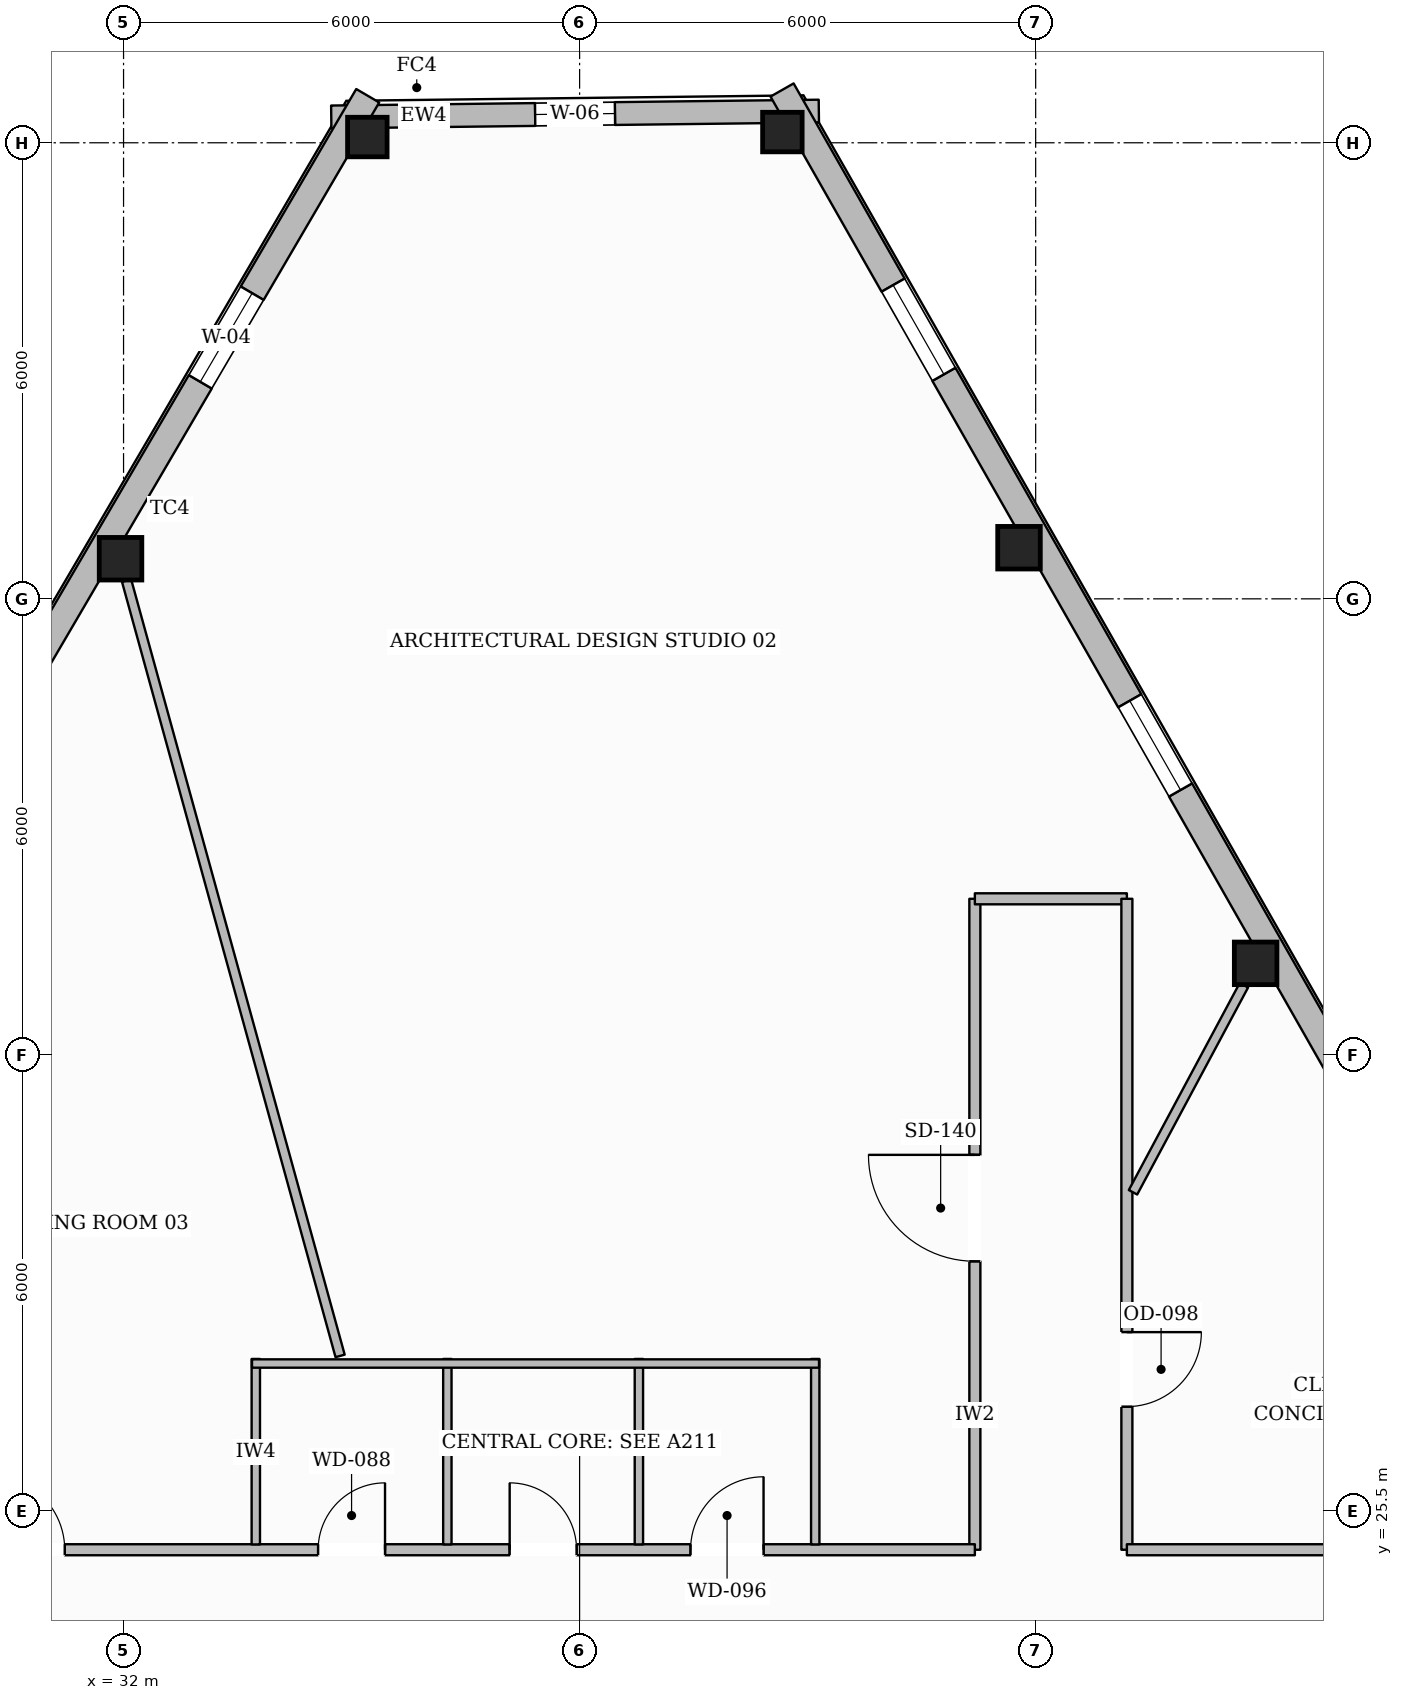
"""IFC4 building model, lengths in metres.
Left out: names, types, materials, properties, quantities, classifications, styles, units other than length and angle.
Written with IfcOpenShell. Run it as: python <this file> out.ifc"""

import sys

from ifc_helpers import new_model, si_unit, direction, frame, frame_2d, origin, origin_2d, place, context, subcontext, project, spatial, rectangle, hollow_rectangle, extrude, element, fill, save


model = new_model("IFC4")
c1 = context("Model", 3, precision=1e-05, world=origin(), true_north=direction((0.0, 1.0)))
c2 = subcontext(c1, "Body", "Model", "MODEL_VIEW")
j1 = project(units=[si_unit("LENGTHUNIT", "METRE"), si_unit("PLANEANGLEUNIT", "RADIAN")], contexts=[c1])
p1 = place(None, origin())
s1 = spatial("IfcSite", under=j1, at=p1, CompositionType="ELEMENT")
p2 = place(p1, origin())
s2 = spatial("IfcBuilding", under=s1, at=p2, CompositionType="ELEMENT")
p3 = place(p2, frame((0.0, 0.0, 289.55)))
s3 = spatial("IfcBuildingStorey", under=s2, at=p3, CompositionType="ELEMENT", Elevation=289.55)
p4 = place(p3, frame((35.208, 43.575, 0.0), z_axis=(0.0, 0.0, 1.0), x_axis=(1.0, 0.0, 0.0)))
e1 = element("IfcColumn", 1, at=p4, inside=s3, PredefinedType="COLUMN", context=c2, shape_type="SweptSolid", body=[
    extrude(hollow_rectangle(XDim=0.52, YDim=0.52, WallThickness=0.024, at=origin_2d()), origin(), (0.0, 0.0, 1.0), 3.61),
])
for number, where, z_axis, x_axis in (
    (2, (31.96, 38.028, 0.0), (0.0, 0.0, 1.0), (1.0, 0.0, 0.0)),
    (3, (46.894, 32.705, 0.0), (0.0, 0.0, 1.0), (1.0, 0.0, 0.0)),
    (4, (43.781, 38.173, 0.0), (0.0, 0.0, 1.0), (1.0, 0.0, 0.0)),
):
    element("IfcColumn", number, at=place(p3, frame(where, z_axis=z_axis, x_axis=x_axis)), inside=s3, PredefinedType="COLUMN", context=c2, shape_type="SweptSolid", body=[
        extrude(hollow_rectangle(XDim=0.56, YDim=0.56, WallThickness=0.025, at=origin_2d()), origin(), (0.0, 0.0, 1.0), 3.61),
    ])
p5 = place(p3, frame((40.668, 43.641, 0.0), z_axis=(0.0, 0.0, 1.0), x_axis=(1.0, 0.0, 0.0)))
e5 = element("IfcColumn", 5, at=p5, inside=s3, PredefinedType="COLUMN", context=c2, shape_type="SweptSolid", body=[
    extrude(hollow_rectangle(XDim=0.52, YDim=0.52, WallThickness=0.024, at=origin_2d()), origin(), (0.0, 0.0, 1.0), 3.61),
])
p6 = place(p3, frame((34.733, 43.84, 0.0), z_axis=(0.0, 0.0, 1.0), x_axis=(0.999928144693, 0.011987720859, 0.0)))
e6 = element("IfcWall", 6, at=p6, inside=s3, PredefinedType="STANDARD", context=c2, shape_type="SweptSolid", body=[
    extrude(rectangle(XDim=6.415, YDim=0.3, at=frame_2d((3.208, 0.0))), origin(), (0.0, 0.0, 1.0), 3.196),
])
p7 = place(p6, frame((2.683, 0.0, 0.65)))
e7 = element("IfcOpeningElement", 7, at=p7, cuts=e6, PredefinedType="OPENING", context=c2, shape_type="SweptSolid", body=[
    extrude(rectangle(XDim=1.05, YDim=1.7, at=frame_2d((0.525, 0.85))), frame((0.0, 0.16, 0.0), z_axis=(0.0, -1.0, 0.0), x_axis=(1.0, 0.0, 0.0)), (0.0, 0.0, 1.0), 0.32),
])
p8 = place(p3, frame((15.251, 10.013, 0.0), z_axis=(0.0, 0.0, 1.0), x_axis=(0.505125442866, 0.863045935608, 0.0)))
e8 = element("IfcWall", 8, at=p8, inside=s3, PredefinedType="STANDARD", context=c2, shape_type="SweptSolid", body=[
    extrude(rectangle(XDim=39.517, YDim=0.35, at=frame_2d((19.759, 0.0))), origin(), (0.0, 0.0, 1.0), 3.196),
])
p9 = place(p8, frame((35.157, 0.0, 0.65)))
e9 = element("IfcOpeningElement", 9, at=p9, cuts=e8, PredefinedType="OPENING", context=c2, shape_type="SweptSolid", body=[
    extrude(rectangle(XDim=1.35, YDim=1.75, at=frame_2d((0.675, 0.875))), frame((0.0, 0.185, 0.0), z_axis=(0.0, -1.0, 0.0), x_axis=(1.0, 0.0, 0.0)), (0.0, 0.0, 1.0), 0.37),
])
p10 = place(p8, frame((28.729, 0.0, 0.65)))
e10 = element("IfcOpeningElement", 10, at=p10, cuts=e8, PredefinedType="OPENING", context=c2, shape_type="SweptSolid", body=[
    extrude(rectangle(XDim=1.35, YDim=1.75, at=frame_2d((0.675, 0.875))), frame((0.0, 0.185, 0.0), z_axis=(0.0, -1.0, 0.0), x_axis=(1.0, 0.0, 0.0)), (0.0, 0.0, 1.0), 0.37),
])
p11 = place(p8, frame((15.872, 0.0, 0.65)))
e11 = element("IfcOpeningElement", 11, at=p11, cuts=e8, PredefinedType="OPENING", context=c2, shape_type="SweptSolid", body=[
    extrude(rectangle(XDim=1.35, YDim=1.75, at=frame_2d((0.675, 0.875))), frame((0.0, 0.185, 0.0), z_axis=(0.0, -1.0, 0.0), x_axis=(1.0, 0.0, 0.0)), (0.0, 0.0, 1.0), 0.37),
])
p12 = place(p8, frame((9.444, 0.0, 0.65)))
e12 = element("IfcOpeningElement", 12, at=p12, cuts=e8, PredefinedType="OPENING", context=c2, shape_type="SweptSolid", body=[
    extrude(rectangle(XDim=1.35, YDim=1.75, at=frame_2d((0.675, 0.875))), frame((0.0, 0.185, 0.0), z_axis=(0.0, -1.0, 0.0), x_axis=(1.0, 0.0, 0.0)), (0.0, 0.0, 1.0), 0.37),
])
p13 = place(p8, frame((3.016, 0.0, 0.65)))
e13 = element("IfcOpeningElement", 13, at=p13, cuts=e8, PredefinedType="OPENING", context=c2, shape_type="SweptSolid", body=[
    extrude(rectangle(XDim=1.35, YDim=1.75, at=frame_2d((0.675, 0.875))), frame((0.0, 0.185, 0.0), z_axis=(0.0, -1.0, 0.0), x_axis=(1.0, 0.0, 0.0)), (0.0, 0.0, 1.0), 0.37),
])
p14 = place(p3, frame((40.664, 44.194, 0.0), z_axis=(0.0, 0.0, 1.0), x_axis=(0.494747407388, -0.869036824814, 0.0)))
e14 = element("IfcWall", 14, at=p14, inside=s3, PredefinedType="STANDARD", context=c2, shape_type="SweptSolid", body=[
    extrude(rectangle(XDim=38.713, YDim=0.35, at=frame_2d((19.357, 0.0))), origin(), (0.0, 0.0, 1.0), 3.196),
])
p15 = place(p14, frame((34.415, 0.0, 0.65)))
e15 = element("IfcOpeningElement", 15, at=p15, cuts=e14, PredefinedType="OPENING", context=c2, shape_type="SweptSolid", body=[
    extrude(rectangle(XDim=1.35, YDim=1.75, at=frame_2d((0.675, 0.875))), frame((0.0, 0.185, 0.0), z_axis=(0.0, -1.0, 0.0), x_axis=(1.0, 0.0, 0.0)), (0.0, 0.0, 1.0), 0.37),
])
p16 = place(p14, frame((28.123, 0.0, 0.65)))
e16 = element("IfcOpeningElement", 16, at=p16, cuts=e14, PredefinedType="OPENING", context=c2, shape_type="SweptSolid", body=[
    extrude(rectangle(XDim=1.35, YDim=1.75, at=frame_2d((0.675, 0.875))), frame((0.0, 0.185, 0.0), z_axis=(0.0, -1.0, 0.0), x_axis=(1.0, 0.0, 0.0)), (0.0, 0.0, 1.0), 0.37),
])
p17 = place(p14, frame((15.539, 0.0, 0.65)))
e17 = element("IfcOpeningElement", 17, at=p17, cuts=e14, PredefinedType="OPENING", context=c2, shape_type="SweptSolid", body=[
    extrude(rectangle(XDim=1.35, YDim=1.75, at=frame_2d((0.675, 0.875))), frame((0.0, 0.185, 0.0), z_axis=(0.0, -1.0, 0.0), x_axis=(1.0, 0.0, 0.0)), (0.0, 0.0, 1.0), 0.37),
])
p18 = place(p14, frame((9.246, 0.0, 0.65)))
e18 = element("IfcOpeningElement", 18, at=p18, cuts=e14, PredefinedType="OPENING", context=c2, shape_type="SweptSolid", body=[
    extrude(rectangle(XDim=1.35, YDim=1.75, at=frame_2d((0.675, 0.875))), frame((0.0, 0.185, 0.0), z_axis=(0.0, -1.0, 0.0), x_axis=(1.0, 0.0, 0.0)), (0.0, 0.0, 1.0), 0.37),
])
p19 = place(p14, frame((2.954, 0.0, 0.65)))
e19 = element("IfcOpeningElement", 19, at=p19, cuts=e14, PredefinedType="OPENING", context=c2, shape_type="SweptSolid", body=[
    extrude(rectangle(XDim=1.35, YDim=1.75, at=frame_2d((0.675, 0.875))), frame((0.0, 0.185, 0.0), z_axis=(0.0, -1.0, 0.0), x_axis=(1.0, 0.0, 0.0)), (0.0, 0.0, 1.0), 0.37),
])
p20 = place(p3, frame((43.2, 24.99, 0.0), z_axis=(0.0, 0.0, 1.0), x_axis=(0.0, 1.0, 0.0)))
e20 = element("IfcWall", 20, at=p20, inside=s3, PredefinedType="PARTITIONING", context=c2, shape_type="SweptSolid", body=[
    extrude(rectangle(XDim=8.564, YDim=0.145, at=frame_2d((4.282, 0.0))), origin(), (0.0, 0.0, 1.0), 3.61),
])
p21 = place(p20, frame((3.795, 0.0, 0.0)))
e21 = element("IfcOpeningElement", 21, at=p21, cuts=e20, PredefinedType="OPENING", context=c2, shape_type="SweptSolid", body=[
    extrude(rectangle(XDim=1.4, YDim=2.2, at=frame_2d((0.7, 1.1))), frame((0.0, 0.083, 0.0), z_axis=(0.0, -1.0, 0.0), x_axis=(1.0, 0.0, 0.0)), (0.0, 0.0, 1.0), 0.165),
])
p22 = place(p3, frame((43.2, 33.554, 0.0), z_axis=(0.0, 0.0, 1.0), x_axis=(1.0, 0.0, 0.0)))
e22 = element("IfcWall", 22, at=p22, inside=s3, PredefinedType="PARTITIONING", context=c2, shape_type="SweptSolid", body=[
    extrude(rectangle(XDim=2.0, YDim=0.145, at=frame_2d((1.0, 0.0))), origin(), (0.0, 0.0, 1.0), 3.61),
])
p23 = place(p3, frame((45.2, 33.554, 0.0), z_axis=(0.0, 0.0, 1.0), x_axis=(0.0, -1.0, 0.0)))
e23 = element("IfcWall", 23, at=p23, inside=s3, PredefinedType="PARTITIONING", context=c2, shape_type="SweptSolid", body=[
    extrude(rectangle(XDim=8.564, YDim=0.145, at=frame_2d((4.282, 0.0))), origin(), (0.0, 0.0, 1.0), 3.61),
])
p24 = place(p23, frame((5.701, 0.0, 0.0)))
e24 = element("IfcOpeningElement", 24, at=p24, cuts=e23, PredefinedType="OPENING", context=c2, shape_type="SweptSolid", body=[
    extrude(rectangle(XDim=0.98, YDim=2.15, at=frame_2d((0.49, 1.075))), frame((0.0, 0.083, 0.0), z_axis=(0.0, -1.0, 0.0), x_axis=(1.0, 0.0, 0.0)), (0.0, 0.0, 1.0), 0.165),
])
p25 = place(p3, frame((45.2, 24.99, 0.0), z_axis=(0.0, 0.0, 1.0), x_axis=(1.0, 0.0, 0.0)))
e25 = element("IfcWall", 25, at=p25, inside=s3, PredefinedType="PARTITIONING", context=c2, shape_type="SweptSolid", body=[
    extrude(rectangle(XDim=4.71, YDim=0.145, at=frame_2d((2.355, 0.0))), origin(), (0.0, 0.0, 1.0), 3.61),
])
p26 = place(p3, frame((26.09, 24.99, 0.0), z_axis=(0.0, 0.0, 1.0), x_axis=(1.0, 0.0, 0.0)))
e26 = element("IfcWall", 26, at=p26, inside=s3, PredefinedType="PARTITIONING", context=c2, shape_type="SweptSolid", body=[
    extrude(rectangle(XDim=17.11, YDim=0.145, at=frame_2d((8.555, 0.0))), origin(), (0.0, 0.0, 1.0), 3.61),
])
p27 = place(p26, frame((8.47, 0.0, 0.0)))
e27 = element("IfcOpeningElement", 27, at=p27, cuts=e26, PredefinedType="OPENING", context=c2, shape_type="SweptSolid", body=[
    extrude(rectangle(XDim=0.88, YDim=2.1, at=frame_2d((0.44, 1.05))), frame((0.0, 0.083, 0.0), z_axis=(0.0, -1.0, 0.0), x_axis=(1.0, 0.0, 0.0)), (0.0, 0.0, 1.0), 0.165),
])
p28 = place(p26, frame((10.99, 0.0, 0.0)))
e28 = element("IfcOpeningElement", 28, at=p28, cuts=e26, PredefinedType="OPENING", context=c2, shape_type="SweptSolid", body=[
    extrude(rectangle(XDim=0.88, YDim=2.1, at=frame_2d((0.44, 1.05))), frame((0.0, 0.083, 0.0), z_axis=(0.0, -1.0, 0.0), x_axis=(1.0, 0.0, 0.0)), (0.0, 0.0, 1.0), 0.165),
])
p29 = place(p26, frame((13.37, 0.0, 0.0)))
e29 = element("IfcOpeningElement", 29, at=p29, cuts=e26, PredefinedType="OPENING", context=c2, shape_type="SweptSolid", body=[
    extrude(rectangle(XDim=0.96, YDim=2.1, at=frame_2d((0.48, 1.05))), frame((0.0, 0.083, 0.0), z_axis=(0.0, -1.0, 0.0), x_axis=(1.0, 0.0, 0.0)), (0.0, 0.0, 1.0), 0.165),
])
p30 = place(p26, frame((4.156, 0.0, 0.0)))
e30 = element("IfcOpeningElement", 30, at=p30, cuts=e26, PredefinedType="OPENING", context=c2, shape_type="SweptSolid", body=[
    extrude(rectangle(XDim=0.98, YDim=2.15, at=frame_2d((0.49, 1.075))), frame((0.0, 0.083, 0.0), z_axis=(0.0, -1.0, 0.0), x_axis=(1.0, 0.0, 0.0)), (0.0, 0.0, 1.0), 0.165),
])
for number, where, z_axis, x_axis in (
    (31, (33.74, 25.06, 0.0), (0.0, 0.0, 1.0), (0.0, 1.0, 0.0)),
    (32, (36.26, 25.06, 0.0), (0.0, 0.0, 1.0), (0.0, 1.0, 0.0)),
    (33, (38.78, 25.06, 0.0), (0.0, 0.0, 1.0), (0.0, 1.0, 0.0)),
    (34, (41.1, 25.06, 0.0), (0.0, 0.0, 1.0), (0.0, 1.0, 0.0)),
):
    element("IfcWall", number, at=place(p3, frame(where, z_axis=z_axis, x_axis=x_axis)), inside=s3, PredefinedType="PLUMBINGWALL", context=c2, shape_type="SweptSolid", body=[
        extrude(rectangle(XDim=2.44, YDim=0.11, at=frame_2d((1.22, 0.0))), origin(), (0.0, 0.0, 1.0), 3.61),
    ])
p31 = place(p3, frame((33.69, 27.44, 0.0), z_axis=(0.0, 0.0, 1.0), x_axis=(1.0, 0.0, 0.0)))
e35 = element("IfcWall", 35, at=p31, inside=s3, PredefinedType="PLUMBINGWALL", context=c2, shape_type="SweptSolid", body=[
    extrude(rectangle(XDim=7.46, YDim=0.11, at=frame_2d((3.73, 0.0))), origin(), (0.0, 0.0, 1.0), 3.61),
])
p32 = place(p3, frame((45.281, 29.693, 0.0), z_axis=(0.0, 0.0, 1.0), x_axis=(0.472162212873, 0.881511681564, 0.0)))
e36 = element("IfcWall", 36, at=p32, inside=s3, PredefinedType="PARTITIONING", context=c2, shape_type="SweptSolid", body=[
    extrude(rectangle(XDim=3.09, YDim=0.125, at=frame_2d((1.545, 0.0))), origin(), (0.0, 0.0, 1.0), 3.61),
])
p33 = place(p3, frame((34.849, 27.54, 0.0), z_axis=(0.0, 0.0, 1.0), x_axis=(-0.265543710565, 0.964098821584, 0.0)))
e37 = element("IfcWall", 37, at=p33, inside=s3, PredefinedType="PARTITIONING", context=c2, shape_type="SweptSolid", body=[
    extrude(rectangle(XDim=10.58, YDim=0.125, at=frame_2d((5.29, 0.0))), origin(), (0.0, 0.0, 1.0), 3.61),
])
p34 = place(p9, origin())
e38 = element("IfcWindow", 38, at=p34, inside=s3, PartitioningType="SINGLE_PANEL", PredefinedType="WINDOW", context=c2, shape_type="SweptSolid", body=[
    extrude(rectangle(XDim=1.35, YDim=1.75, at=frame_2d((0.675, 0.875))), frame((0.0, 0.03, 0.0), z_axis=(0.0, -1.0, 0.0), x_axis=(1.0, 0.0, 0.0)), (0.0, 0.0, 1.0), 0.06),
])
fill(e9, e38)
p35 = place(p18, origin())
e39 = element("IfcWindow", 39, at=p35, inside=s3, PartitioningType="SINGLE_PANEL", PredefinedType="WINDOW", context=c2, shape_type="SweptSolid", body=[
    extrude(rectangle(XDim=1.35, YDim=1.75, at=frame_2d((0.675, 0.875))), frame((0.0, 0.03, 0.0), z_axis=(0.0, -1.0, 0.0), x_axis=(1.0, 0.0, 0.0)), (0.0, 0.0, 1.0), 0.06),
])
fill(e18, e39)
p36 = place(p19, origin())
e40 = element("IfcWindow", 40, at=p36, inside=s3, PartitioningType="SINGLE_PANEL", PredefinedType="WINDOW", context=c2, shape_type="SweptSolid", body=[
    extrude(rectangle(XDim=1.35, YDim=1.75, at=frame_2d((0.675, 0.875))), frame((0.0, 0.03, 0.0), z_axis=(0.0, -1.0, 0.0), x_axis=(1.0, 0.0, 0.0)), (0.0, 0.0, 1.0), 0.06),
])
fill(e19, e40)
p37 = place(p7, origin())
e41 = element("IfcWindow", 41, at=p37, inside=s3, PartitioningType="SINGLE_PANEL", PredefinedType="WINDOW", context=c2, shape_type="SweptSolid", body=[
    extrude(rectangle(XDim=1.05, YDim=1.7, at=frame_2d((0.525, 0.85))), frame((0.0, 0.03, 0.0), z_axis=(0.0, -1.0, 0.0), x_axis=(1.0, 0.0, 0.0)), (0.0, 0.0, 1.0), 0.06),
])
fill(e7, e41)
p38 = place(p27, origin())
e42 = element("IfcDoor", 42, at=p38, inside=s3, OperationType="SINGLE_SWING_RIGHT", PredefinedType="DOOR", context=c2, shape_type="SweptSolid", body=[
    extrude(rectangle(XDim=0.88, YDim=2.1, at=frame_2d((0.44, 1.05))), frame((0.0, 0.025, 0.0), z_axis=(0.0, -1.0, 0.0), x_axis=(1.0, 0.0, 0.0)), (0.0, 0.0, 1.0), 0.05),
])
fill(e27, e42)
p39 = place(p28, origin())
e43 = element("IfcDoor", 43, at=p39, inside=s3, OperationType="SINGLE_SWING_LEFT", PredefinedType="DOOR", context=c2, shape_type="SweptSolid", body=[
    extrude(rectangle(XDim=0.88, YDim=2.1, at=frame_2d((0.44, 1.05))), frame((0.0, 0.025, 0.0), z_axis=(0.0, -1.0, 0.0), x_axis=(1.0, 0.0, 0.0)), (0.0, 0.0, 1.0), 0.05),
])
fill(e28, e43)
p40 = place(p29, origin())
e44 = element("IfcDoor", 44, at=p40, inside=s3, OperationType="SINGLE_SWING_RIGHT", PredefinedType="DOOR", context=c2, shape_type="SweptSolid", body=[
    extrude(rectangle(XDim=0.96, YDim=2.1, at=frame_2d((0.48, 1.05))), frame((0.0, 0.025, 0.0), z_axis=(0.0, -1.0, 0.0), x_axis=(1.0, 0.0, 0.0)), (0.0, 0.0, 1.0), 0.05),
])
fill(e29, e44)
p41 = place(p24, origin())
e45 = element("IfcDoor", 45, at=p41, inside=s3, OperationType="SINGLE_SWING_LEFT", PredefinedType="DOOR", context=c2, shape_type="SweptSolid", body=[
    extrude(rectangle(XDim=0.98, YDim=2.15, at=frame_2d((0.49, 1.075))), frame((0.0, 0.025, 0.0), z_axis=(0.0, -1.0, 0.0), x_axis=(1.0, 0.0, 0.0)), (0.0, 0.0, 1.0), 0.05),
])
fill(e24, e45)
p42 = place(p21, origin())
e46 = element("IfcDoor", 46, at=p42, inside=s3, OperationType="SINGLE_SWING_RIGHT", PredefinedType="DOOR", context=c2, shape_type="SweptSolid", body=[
    extrude(rectangle(XDim=1.4, YDim=2.2, at=frame_2d((0.7, 1.1))), frame((0.0, 0.025, 0.0), z_axis=(0.0, -1.0, 0.0), x_axis=(1.0, 0.0, 0.0)), (0.0, 0.0, 1.0), 0.05),
])
fill(e21, e46)
p43 = place(p30, origin())
e47 = element("IfcDoor", 47, at=p43, inside=s3, OperationType="SINGLE_SWING_LEFT", PredefinedType="DOOR", context=c2, shape_type="SweptSolid", body=[
    extrude(rectangle(XDim=0.98, YDim=2.15, at=frame_2d((0.49, 1.075))), frame((0.0, 0.025, 0.0), z_axis=(0.0, -1.0, 0.0), x_axis=(1.0, 0.0, 0.0)), (0.0, 0.0, 1.0), 0.05),
])
fill(e30, e47)
save(model, sys.argv[1])
